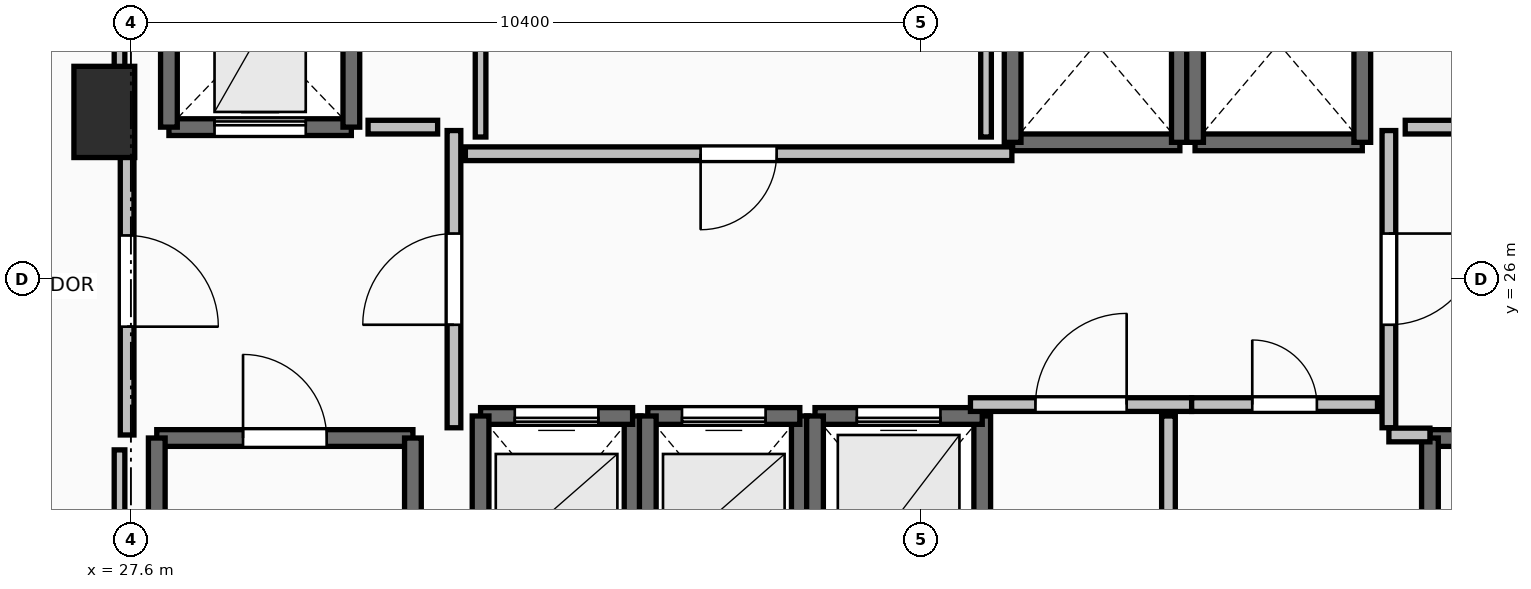
"""IFC4 building model, lengths in metres.
Left out: names, types, materials, properties, quantities, classifications, styles, units other than length and angle.
Written with IfcOpenShell. Run it as: python <this file> out.ifc"""

import sys

from ifc_helpers import new_model, si_unit, direction, frame, frame_2d, origin, origin_2d, place, context, subcontext, project, spatial, rectangle, extrude, element, fill, save


model = new_model("IFC4")
c1 = context("Model", 3, precision=1e-05, world=origin(), true_north=direction((0.0, 1.0)))
c2 = subcontext(c1, "Body", "Model", "MODEL_VIEW")
j1 = project(units=[si_unit("LENGTHUNIT", "METRE"), si_unit("PLANEANGLEUNIT", "RADIAN")], contexts=[c1])
p1 = place(None, origin())
s1 = spatial("IfcSite", under=j1, at=p1, CompositionType="ELEMENT")
p2 = place(p1, origin())
s2 = spatial("IfcBuilding", under=s1, at=p2, CompositionType="ELEMENT")
p3 = place(p2, frame((0.0, 0.0, 153.6)))
s3 = spatial("IfcBuildingStorey", under=s2, at=p3, CompositionType="ELEMENT", Elevation=153.6)
p4 = place(p3, frame((27.25, 28.2, 0.0), z_axis=(0.0, 0.0, 1.0), x_axis=(1.0, 0.0, 0.0)))
e1 = element("IfcColumn", 1, at=p4, inside=s3, PredefinedType="PILASTER", context=c2, shape_type="SweptSolid", body=[
    extrude(rectangle(XDim=0.8, YDim=1.2, at=origin_2d()), origin(), (0.0, 0.0, 1.0), 3.5),
])
p5 = place(p3, frame((27.94, 23.91, 0.0), z_axis=(0.0, 0.0, 1.0), x_axis=(1.0, 0.0, 0.0)))
e2 = element("IfcWall", 2, at=p5, inside=s3, PredefinedType="SOLIDWALL", context=c2, shape_type="SweptSolid", body=[
    extrude(rectangle(XDim=3.37, YDim=0.22, at=frame_2d((1.685, 0.0))), origin(), (0.0, 0.0, 1.0), 3.24),
])
p6 = place(p5, frame((1.135, 0.0, 0.0)))
e3 = element("IfcOpeningElement", 3, at=p6, cuts=e2, PredefinedType="OPENING", context=c2, shape_type="SweptSolid", body=[
    extrude(rectangle(XDim=1.1, YDim=2.15, at=frame_2d((0.55, 1.075))), frame((0.0, 0.125, 0.0), z_axis=(0.0, -1.0, 0.0), x_axis=(1.0, 0.0, 0.0)), (0.0, 0.0, 1.0), 0.25),
])
for number, where, z_axis, x_axis in (
    (4, (31.31, 23.91, 0.0), (0.0, 0.0, 1.0), (0.0, -1.0, 0.0)),
    (5, (27.94, 16.49, 0.0), (0.0, 0.0, 1.0), (0.0, 1.0, 0.0)),
):
    element("IfcWall", number, at=place(p3, frame(where, z_axis=z_axis, x_axis=x_axis)), inside=s3, PredefinedType="SOLIDWALL", context=c2, shape_type="SweptSolid", body=[
        extrude(rectangle(XDim=7.42, YDim=0.22, at=frame_2d((3.71, 0.0))), origin(), (0.0, 0.0, 1.0), 3.24),
    ])
p7 = place(p3, frame((44.69, 23.91, 0.0), z_axis=(0.0, 0.0, 1.0), x_axis=(1.0, 0.0, 0.0)))
e6 = element("IfcWall", 6, at=p7, inside=s3, PredefinedType="SOLIDWALL", context=c2, shape_type="SweptSolid", body=[
    extrude(rectangle(XDim=3.37, YDim=0.22, at=frame_2d((1.685, 0.0))), origin(), (0.0, 0.0, 1.0), 3.24),
])
p8 = place(p7, frame((1.135, 0.0, 0.0)))
e7 = element("IfcOpeningElement", 7, at=p8, cuts=e6, PredefinedType="OPENING", context=c2, shape_type="SweptSolid", body=[
    extrude(rectangle(XDim=1.1, YDim=2.15, at=frame_2d((0.55, 1.075))), frame((0.0, 0.125, 0.0), z_axis=(0.0, -1.0, 0.0), x_axis=(1.0, 0.0, 0.0)), (0.0, 0.0, 1.0), 0.25),
])
p9 = place(p3, frame((44.69, 16.49, 0.0), z_axis=(0.0, 0.0, 1.0), x_axis=(0.0, 1.0, 0.0)))
e8 = element("IfcWall", 8, at=p9, inside=s3, PredefinedType="SOLIDWALL", context=c2, shape_type="SweptSolid", body=[
    extrude(rectangle(XDim=7.42, YDim=0.22, at=frame_2d((3.71, 0.0))), origin(), (0.0, 0.0, 1.0), 3.24),
])
p10 = place(p3, frame((34.2, 21.8, 0.0), z_axis=(0.0, 0.0, 1.0), x_axis=(0.0, 1.0, 0.0)))
e9 = element("IfcWall", 9, at=p10, inside=s3, PredefinedType="SOLIDWALL", context=c2, shape_type="SweptSolid", body=[
    extrude(rectangle(XDim=2.4, YDim=0.22, at=frame_2d((1.2, 0.0))), origin(), (0.0, 0.0, 1.0), 3.24),
])
p11 = place(p3, frame((34.2, 24.2, 0.0), z_axis=(0.0, 0.0, 1.0), x_axis=(-1.0, 0.0, 0.0)))
e10 = element("IfcWall", 10, at=p11, inside=s3, PredefinedType="SOLIDWALL", context=c2, shape_type="SweptSolid", body=[
    extrude(rectangle(XDim=2.0, YDim=0.22, at=frame_2d((1.0, 0.0))), origin(), (0.0, 0.0, 1.0), 3.24),
])
p12 = place(p11, frame((0.45, 0.0, 0.0)))
e11 = element("IfcOpeningElement", 11, at=p12, cuts=e10, PredefinedType="OPENING", context=c2, shape_type="SweptSolid", body=[
    extrude(rectangle(XDim=1.1, YDim=2.2, at=frame_2d((0.55, 1.1))), frame((0.0, 0.125, 0.0), z_axis=(0.0, -1.0, 0.0), x_axis=(1.0, 0.0, 0.0)), (0.0, 0.0, 1.0), 0.25),
])
for number, where, z_axis, x_axis in (
    (12, (32.2, 24.2, 0.0), (0.0, 0.0, 1.0), (0.0, -1.0, 0.0)),
    (13, (36.4, 21.8, 0.0), (0.0, 0.0, 1.0), (0.0, 1.0, 0.0)),
):
    element("IfcWall", number, at=place(p3, frame(where, z_axis=z_axis, x_axis=x_axis)), inside=s3, PredefinedType="SOLIDWALL", context=c2, shape_type="SweptSolid", body=[
        extrude(rectangle(XDim=2.4, YDim=0.22, at=frame_2d((1.2, 0.0))), origin(), (0.0, 0.0, 1.0), 3.24),
    ])
p13 = place(p3, frame((36.4, 24.2, 0.0), z_axis=(0.0, 0.0, 1.0), x_axis=(-1.0, 0.0, 0.0)))
e14 = element("IfcWall", 14, at=p13, inside=s3, PredefinedType="SOLIDWALL", context=c2, shape_type="SweptSolid", body=[
    extrude(rectangle(XDim=2.0, YDim=0.22, at=frame_2d((1.0, 0.0))), origin(), (0.0, 0.0, 1.0), 3.24),
])
p14 = place(p13, frame((0.45, 0.0, 0.0)))
e15 = element("IfcOpeningElement", 15, at=p14, cuts=e14, PredefinedType="OPENING", context=c2, shape_type="SweptSolid", body=[
    extrude(rectangle(XDim=1.1, YDim=2.2, at=frame_2d((0.55, 1.1))), frame((0.0, 0.125, 0.0), z_axis=(0.0, -1.0, 0.0), x_axis=(1.0, 0.0, 0.0)), (0.0, 0.0, 1.0), 0.25),
])
p15 = place(p3, frame((34.4, 24.2, 0.0), z_axis=(0.0, 0.0, 1.0), x_axis=(0.0, -1.0, 0.0)))
e16 = element("IfcWall", 16, at=p15, inside=s3, PredefinedType="SOLIDWALL", context=c2, shape_type="SweptSolid", body=[
    extrude(rectangle(XDim=2.4, YDim=0.22, at=frame_2d((1.2, 0.0))), origin(), (0.0, 0.0, 1.0), 3.24),
])
p16 = place(p3, frame((38.8, 21.6, 0.0), z_axis=(0.0, 0.0, 1.0), x_axis=(0.0, 1.0, 0.0)))
e17 = element("IfcWall", 17, at=p16, inside=s3, PredefinedType="SOLIDWALL", context=c2, shape_type="SweptSolid", body=[
    extrude(rectangle(XDim=2.6, YDim=0.22, at=frame_2d((1.3, 0.0))), origin(), (0.0, 0.0, 1.0), 3.24),
])
p17 = place(p3, frame((38.8, 24.2, 0.0), z_axis=(0.0, 0.0, 1.0), x_axis=(-1.0, 0.0, 0.0)))
e18 = element("IfcWall", 18, at=p17, inside=s3, PredefinedType="SOLIDWALL", context=c2, shape_type="SweptSolid", body=[
    extrude(rectangle(XDim=2.2, YDim=0.22, at=frame_2d((1.1, 0.0))), origin(), (0.0, 0.0, 1.0), 3.24),
])
p18 = place(p17, frame((0.55, 0.0, 0.0)))
e19 = element("IfcOpeningElement", 19, at=p18, cuts=e18, PredefinedType="OPENING", context=c2, shape_type="SweptSolid", body=[
    extrude(rectangle(XDim=1.1, YDim=2.2, at=frame_2d((0.55, 1.1))), frame((0.0, 0.125, 0.0), z_axis=(0.0, -1.0, 0.0), x_axis=(1.0, 0.0, 0.0)), (0.0, 0.0, 1.0), 0.25),
])
p19 = place(p3, frame((36.6, 24.2, 0.0), z_axis=(0.0, 0.0, 1.0), x_axis=(0.0, -1.0, 0.0)))
e20 = element("IfcWall", 20, at=p19, inside=s3, PredefinedType="SOLIDWALL", context=c2, shape_type="SweptSolid", body=[
    extrude(rectangle(XDim=2.6, YDim=0.22, at=frame_2d((1.3, 0.0))), origin(), (0.0, 0.0, 1.0), 3.24),
])
p20 = place(p3, frame((39.2, 27.8, 0.0), z_axis=(0.0, 0.0, 1.0), x_axis=(1.0, 0.0, 0.0)))
e21 = element("IfcWall", 21, at=p20, inside=s3, PredefinedType="SOLIDWALL", context=c2, shape_type="SweptSolid", body=[
    extrude(rectangle(XDim=2.2, YDim=0.22, at=frame_2d((1.1, 0.0))), origin(), (0.0, 0.0, 1.0), 3.24),
])
for number, where, z_axis, x_axis in (
    (22, (41.4, 27.8, 0.0), (0.0, 0.0, 1.0), (0.0, 1.0, 0.0)),
    (23, (39.2, 30.4, 0.0), (0.0, 0.0, 1.0), (0.0, -1.0, 0.0)),
):
    element("IfcWall", number, at=place(p3, frame(where, z_axis=z_axis, x_axis=x_axis)), inside=s3, PredefinedType="SOLIDWALL", context=c2, shape_type="SweptSolid", body=[
        extrude(rectangle(XDim=2.6, YDim=0.22, at=frame_2d((1.3, 0.0))), origin(), (0.0, 0.0, 1.0), 3.24),
    ])
p21 = place(p3, frame((41.6, 27.8, 0.0), z_axis=(0.0, 0.0, 1.0), x_axis=(1.0, 0.0, 0.0)))
e24 = element("IfcWall", 24, at=p21, inside=s3, PredefinedType="SOLIDWALL", context=c2, shape_type="SweptSolid", body=[
    extrude(rectangle(XDim=2.2, YDim=0.22, at=frame_2d((1.1, 0.0))), origin(), (0.0, 0.0, 1.0), 3.24),
])
for number, where, z_axis, x_axis in (
    (25, (43.8, 27.8, 0.0), (0.0, 0.0, 1.0), (0.0, 1.0, 0.0)),
    (26, (41.6, 30.4, 0.0), (0.0, 0.0, 1.0), (0.0, -1.0, 0.0)),
):
    element("IfcWall", number, at=place(p3, frame(where, z_axis=z_axis, x_axis=x_axis)), inside=s3, PredefinedType="SOLIDWALL", context=c2, shape_type="SweptSolid", body=[
        extrude(rectangle(XDim=2.6, YDim=0.22, at=frame_2d((1.3, 0.0))), origin(), (0.0, 0.0, 1.0), 3.24),
    ])
p22 = place(p3, frame((28.1, 28.0, 0.0), z_axis=(0.0, 0.0, 1.0), x_axis=(1.0, 0.0, 0.0)))
e27 = element("IfcWall", 27, at=p22, inside=s3, PredefinedType="SHEAR", context=c2, shape_type="SweptSolid", body=[
    extrude(rectangle(XDim=2.4, YDim=0.22, at=frame_2d((1.2, 0.0))), origin(), (0.0, 0.0, 1.0), 3.24),
])
p23 = place(p22, frame((0.6, 0.0, 0.0)))
e28 = element("IfcOpeningElement", 28, at=p23, cuts=e27, PredefinedType="OPENING", context=c2, shape_type="SweptSolid", body=[
    extrude(rectangle(XDim=1.2, YDim=2.2, at=frame_2d((0.6, 1.1))), frame((0.0, 0.125, 0.0), z_axis=(0.0, -1.0, 0.0), x_axis=(1.0, 0.0, 0.0)), (0.0, 0.0, 1.0), 0.25),
])
for number, where, z_axis, x_axis in (
    (29, (30.5, 28.0, 0.0), (0.0, 0.0, 1.0), (0.0, 1.0, 0.0)),
    (30, (28.1, 30.5, 0.0), (0.0, 0.0, 1.0), (0.0, -1.0, 0.0)),
):
    element("IfcWall", number, at=place(p3, frame(where, z_axis=z_axis, x_axis=x_axis)), inside=s3, PredefinedType="SHEAR", context=c2, shape_type="SweptSolid", body=[
        extrude(rectangle(XDim=2.5, YDim=0.22, at=frame_2d((1.25, 0.0))), origin(), (0.0, 0.0, 1.0), 3.24),
    ])
p24 = place(p3, frame((31.85, 24.045, 0.0), z_axis=(0.0, 0.0, 1.0), x_axis=(0.0, 1.0, 0.0)))
e31 = element("IfcWall", 31, at=p24, inside=s3, PredefinedType="PARTITIONING", context=c2, shape_type="SweptSolid", body=[
    extrude(rectangle(XDim=3.91, YDim=0.18, at=frame_2d((1.955, 0.0))), origin(), (0.0, 0.0, 1.0), 3.24),
])
p25 = place(p24, frame((1.355, 0.0, 0.0)))
e32 = element("IfcOpeningElement", 32, at=p25, cuts=e31, PredefinedType="OPENING", context=c2, shape_type="SweptSolid", body=[
    extrude(rectangle(XDim=1.2, YDim=2.15, at=frame_2d((0.6, 1.075))), frame((0.0, 0.105, 0.0), z_axis=(0.0, -1.0, 0.0), x_axis=(1.0, 0.0, 0.0)), (0.0, 0.0, 1.0), 0.21),
])
p26 = place(p3, frame((27.55, 28.0, 0.0), z_axis=(0.0, 0.0, 1.0), x_axis=(0.0, -1.0, 0.0)))
e33 = element("IfcWall", 33, at=p26, inside=s3, PredefinedType="PARTITIONING", context=c2, shape_type="SweptSolid", body=[
    extrude(rectangle(XDim=4.05, YDim=0.18, at=frame_2d((2.025, 0.0))), origin(), (0.0, 0.0, 1.0), 3.24),
])
p27 = place(p26, frame((1.425, 0.0, 0.0)))
e34 = element("IfcOpeningElement", 34, at=p27, cuts=e33, PredefinedType="OPENING", context=c2, shape_type="SweptSolid", body=[
    extrude(rectangle(XDim=1.2, YDim=2.15, at=frame_2d((0.6, 1.075))), frame((0.0, 0.105, 0.0), z_axis=(0.0, -1.0, 0.0), x_axis=(1.0, 0.0, 0.0)), (0.0, 0.0, 1.0), 0.21),
])
p28 = place(p3, frame((44.15, 27.955, 0.0), z_axis=(0.0, 0.0, 1.0), x_axis=(0.0, -1.0, 0.0)))
e35 = element("IfcWall", 35, at=p28, inside=s3, PredefinedType="PARTITIONING", context=c2, shape_type="SweptSolid", body=[
    extrude(rectangle(XDim=3.91, YDim=0.18, at=frame_2d((1.955, 0.0))), origin(), (0.0, 0.0, 1.0), 3.24),
])
p29 = place(p28, frame((1.355, 0.0, 0.0)))
e36 = element("IfcOpeningElement", 36, at=p29, cuts=e35, PredefinedType="OPENING", context=c2, shape_type="SweptSolid", body=[
    extrude(rectangle(XDim=1.2, YDim=2.15, at=frame_2d((0.6, 1.075))), frame((0.0, 0.105, 0.0), z_axis=(0.0, -1.0, 0.0), x_axis=(1.0, 0.0, 0.0)), (0.0, 0.0, 1.0), 0.21),
])
p30 = place(p3, frame((44.15, 23.95, 0.0), z_axis=(0.0, 0.0, 1.0), x_axis=(1.0, 0.0, 0.0)))
e37 = element("IfcWall", 37, at=p30, inside=s3, PredefinedType="PARTITIONING", context=c2, shape_type="SweptSolid", body=[
    extrude(rectangle(XDim=0.54, YDim=0.18, at=frame_2d((0.27, 0.0))), origin(), (0.0, 0.0, 1.0), 3.24),
])
p31 = place(p3, frame((38.645, 24.35, 0.0), z_axis=(0.0, 0.0, 1.0), x_axis=(1.0, 0.0, 0.0)))
e38 = element("IfcWall", 38, at=p31, inside=s3, PredefinedType="PARTITIONING", context=c2, shape_type="SweptSolid", body=[
    extrude(rectangle(XDim=2.91, YDim=0.18, at=frame_2d((1.455, 0.0))), origin(), (0.0, 0.0, 1.0), 3.24),
])
p32 = place(p31, frame((0.855, 0.0, 0.0)))
e39 = element("IfcOpeningElement", 39, at=p32, cuts=e38, PredefinedType="OPENING", context=c2, shape_type="SweptSolid", body=[
    extrude(rectangle(XDim=1.2, YDim=2.15, at=frame_2d((0.6, 1.075))), frame((0.0, 0.105, 0.0), z_axis=(0.0, -1.0, 0.0), x_axis=(1.0, 0.0, 0.0)), (0.0, 0.0, 1.0), 0.21),
])
p33 = place(p3, frame((41.555, 24.35, 0.0), z_axis=(0.0, 0.0, 1.0), x_axis=(1.0, 0.0, 0.0)))
e40 = element("IfcWall", 40, at=p33, inside=s3, PredefinedType="PARTITIONING", context=c2, shape_type="SweptSolid", body=[
    extrude(rectangle(XDim=2.445, YDim=0.18, at=frame_2d((1.223, 0.0))), origin(), (0.0, 0.0, 1.0), 3.24),
])
p34 = place(p33, frame((0.798, 0.0, 0.0)))
e41 = element("IfcOpeningElement", 41, at=p34, cuts=e40, PredefinedType="OPENING", context=c2, shape_type="SweptSolid", body=[
    extrude(rectangle(XDim=0.85, YDim=2.1, at=frame_2d((0.425, 1.05))), frame((0.0, 0.105, 0.0), z_axis=(0.0, -1.0, 0.0), x_axis=(1.0, 0.0, 0.0)), (0.0, 0.0, 1.0), 0.21),
])
p35 = place(p3, frame((39.19, 27.65, 0.0), z_axis=(0.0, 0.0, 1.0), x_axis=(-1.0, 0.0, 0.0)))
e42 = element("IfcWall", 42, at=p35, inside=s3, PredefinedType="PARTITIONING", context=c2, shape_type="SweptSolid", body=[
    extrude(rectangle(XDim=7.19, YDim=0.18, at=frame_2d((3.595, 0.0))), origin(), (0.0, 0.0, 1.0), 3.24),
])
p36 = place(p35, frame((3.095, 0.0, 0.0)))
e43 = element("IfcOpeningElement", 43, at=p36, cuts=e42, PredefinedType="OPENING", context=c2, shape_type="SweptSolid", body=[
    extrude(rectangle(XDim=1.0, YDim=2.15, at=frame_2d((0.5, 1.075))), frame((0.0, 0.105, 0.0), z_axis=(0.0, -1.0, 0.0), x_axis=(1.0, 0.0, 0.0)), (0.0, 0.0, 1.0), 0.21),
])
p37 = place(p3, frame((41.25, 20.305, 0.0), z_axis=(0.0, 0.0, 1.0), x_axis=(0.0, 1.0, 0.0)))
e44 = element("IfcWall", 44, at=p37, inside=s3, PredefinedType="PARTITIONING", context=c2, shape_type="SweptSolid", body=[
    extrude(rectangle(XDim=3.895, YDim=0.18, at=frame_2d((1.948, 0.0))), origin(), (0.0, 0.0, 1.0), 3.24),
])
p38 = place(p37, frame((1.522, 0.0, 0.0)))
e45 = element("IfcOpeningElement", 45, at=p38, cuts=e44, PredefinedType="OPENING", context=c2, shape_type="SweptSolid", body=[
    extrude(rectangle(XDim=0.85, YDim=2.1, at=frame_2d((0.425, 1.05))), frame((0.0, 0.105, 0.0), z_axis=(0.0, -1.0, 0.0), x_axis=(1.0, 0.0, 0.0)), (0.0, 0.0, 1.0), 0.21),
])
for number, where, z_axis, x_axis in (
    (46, (31.635, 28.0, 0.0), (0.0, 0.0, 1.0), (-1.0, 0.0, 0.0)),
    (47, (45.28, 28.0, 0.0), (0.0, 0.0, 1.0), (-1.0, 0.0, 0.0)),
):
    element("IfcWall", number, at=place(p3, frame(where, z_axis=z_axis, x_axis=x_axis)), inside=s3, PredefinedType="PARTITIONING", context=c2, shape_type="SweptSolid", body=[
        extrude(rectangle(XDim=0.915, YDim=0.18, at=frame_2d((0.458, 0.0))), origin(), (0.0, 0.0, 1.0), 3.24),
    ])
for number, where, z_axis, x_axis in (
    (48, (32.2, 30.26, 0.0), (0.0, 0.0, 1.0), (0.0, -1.0, 0.0)),
    (49, (38.85, 27.87, 0.0), (0.0, 0.0, 1.0), (0.0, 1.0, 0.0)),
):
    element("IfcWall", number, at=place(p3, frame(where, z_axis=z_axis, x_axis=x_axis)), inside=s3, PredefinedType="PARTITIONING", context=c2, shape_type="SweptSolid", body=[
        extrude(rectangle(XDim=2.39, YDim=0.14, at=frame_2d((1.195, 0.0))), origin(), (0.0, 0.0, 1.0), 3.24),
    ])
p39 = place(p3, frame((27.45, 33.45, 0.0), z_axis=(0.0, 0.0, 1.0), x_axis=(0.0, -1.0, 0.0)))
e50 = element("IfcWall", 50, at=p39, inside=s3, PredefinedType="PARTITIONING", context=c2, shape_type="SweptSolid", body=[
    extrude(rectangle(XDim=5.254, YDim=0.14, at=frame_2d((2.627, 0.0))), origin(), (0.0, 0.0, 1.0), 2.432),
])
p40 = place(p3, frame((27.45, 23.754, 0.0), z_axis=(0.0, 0.0, 1.0), x_axis=(0.0, -1.0, 0.0)))
e51 = element("IfcWall", 51, at=p40, inside=s3, PredefinedType="PARTITIONING", context=c2, shape_type="SweptSolid", body=[
    extrude(rectangle(XDim=7.514, YDim=0.14, at=frame_2d((3.757, 0.0))), origin(), (0.0, 0.0, 1.0), 2.432),
])
p41 = place(p6, origin())
e52 = element("IfcDoor", 52, at=p41, inside=s3, OperationType="SINGLE_SWING_LEFT", PredefinedType="DOOR", context=c2, shape_type="SweptSolid", body=[
    extrude(rectangle(XDim=1.1, YDim=2.15, at=frame_2d((0.55, 1.075))), frame((0.0, 0.025, 0.0), z_axis=(0.0, -1.0, 0.0), x_axis=(1.0, 0.0, 0.0)), (0.0, 0.0, 1.0), 0.05),
])
fill(e3, e52)
p42 = place(p12, origin())
e53 = element("IfcDoor", 53, at=p42, inside=s3, OperationType="SLIDING_TO_LEFT", PredefinedType="DOOR", context=c2, shape_type="SweptSolid", body=[
    extrude(rectangle(XDim=1.1, YDim=2.2, at=frame_2d((0.55, 1.1))), frame((0.0, 0.025, 0.0), z_axis=(0.0, -1.0, 0.0), x_axis=(1.0, 0.0, 0.0)), (0.0, 0.0, 1.0), 0.05),
])
fill(e11, e53)
p43 = place(p14, origin())
e54 = element("IfcDoor", 54, at=p43, inside=s3, OperationType="SLIDING_TO_LEFT", PredefinedType="DOOR", context=c2, shape_type="SweptSolid", body=[
    extrude(rectangle(XDim=1.1, YDim=2.2, at=frame_2d((0.55, 1.1))), frame((0.0, 0.025, 0.0), z_axis=(0.0, -1.0, 0.0), x_axis=(1.0, 0.0, 0.0)), (0.0, 0.0, 1.0), 0.05),
])
fill(e15, e54)
p44 = place(p18, origin())
e55 = element("IfcDoor", 55, at=p44, inside=s3, OperationType="SLIDING_TO_LEFT", PredefinedType="DOOR", context=c2, shape_type="SweptSolid", body=[
    extrude(rectangle(XDim=1.1, YDim=2.2, at=frame_2d((0.55, 1.1))), frame((0.0, 0.025, 0.0), z_axis=(0.0, -1.0, 0.0), x_axis=(1.0, 0.0, 0.0)), (0.0, 0.0, 1.0), 0.05),
])
fill(e19, e55)
p45 = place(p23, origin())
e56 = element("IfcDoor", 56, at=p45, inside=s3, OperationType="SLIDING_TO_LEFT", PredefinedType="DOOR", context=c2, shape_type="SweptSolid", body=[
    extrude(rectangle(XDim=1.2, YDim=2.2, at=frame_2d((0.6, 1.1))), frame((0.0, 0.025, 0.0), z_axis=(0.0, -1.0, 0.0), x_axis=(1.0, 0.0, 0.0)), (0.0, 0.0, 1.0), 0.05),
])
fill(e28, e56)
p46 = place(p25, origin())
e57 = element("IfcDoor", 57, at=p46, inside=s3, OperationType="SINGLE_SWING_LEFT", PredefinedType="DOOR", context=c2, shape_type="SweptSolid", body=[
    extrude(rectangle(XDim=1.2, YDim=2.15, at=frame_2d((0.6, 1.075))), frame((0.0, 0.025, 0.0), z_axis=(0.0, -1.0, 0.0), x_axis=(1.0, 0.0, 0.0)), (0.0, 0.0, 1.0), 0.05),
])
fill(e32, e57)
p47 = place(p27, origin())
e58 = element("IfcDoor", 58, at=p47, inside=s3, OperationType="SINGLE_SWING_RIGHT", PredefinedType="DOOR", context=c2, shape_type="SweptSolid", body=[
    extrude(rectangle(XDim=1.2, YDim=2.15, at=frame_2d((0.6, 1.075))), frame((0.0, 0.025, 0.0), z_axis=(0.0, -1.0, 0.0), x_axis=(1.0, 0.0, 0.0)), (0.0, 0.0, 1.0), 0.05),
])
fill(e34, e58)
p48 = place(p29, origin())
e59 = element("IfcDoor", 59, at=p48, inside=s3, OperationType="SINGLE_SWING_LEFT", PredefinedType="DOOR", context=c2, shape_type="SweptSolid", body=[
    extrude(rectangle(XDim=1.2, YDim=2.15, at=frame_2d((0.6, 1.075))), frame((0.0, 0.025, 0.0), z_axis=(0.0, -1.0, 0.0), x_axis=(1.0, 0.0, 0.0)), (0.0, 0.0, 1.0), 0.05),
])
fill(e36, e59)
p49 = place(p32, origin())
e60 = element("IfcDoor", 60, at=p49, inside=s3, OperationType="SINGLE_SWING_RIGHT", PredefinedType="DOOR", context=c2, shape_type="SweptSolid", body=[
    extrude(rectangle(XDim=1.2, YDim=2.15, at=frame_2d((0.6, 1.075))), frame((0.0, 0.025, 0.0), z_axis=(0.0, -1.0, 0.0), x_axis=(1.0, 0.0, 0.0)), (0.0, 0.0, 1.0), 0.05),
])
fill(e39, e60)
p50 = place(p34, origin())
e61 = element("IfcDoor", 61, at=p50, inside=s3, OperationType="SINGLE_SWING_LEFT", PredefinedType="DOOR", context=c2, shape_type="SweptSolid", body=[
    extrude(rectangle(XDim=0.85, YDim=2.1, at=frame_2d((0.425, 1.05))), frame((0.0, 0.025, 0.0), z_axis=(0.0, -1.0, 0.0), x_axis=(1.0, 0.0, 0.0)), (0.0, 0.0, 1.0), 0.05),
])
fill(e41, e61)
p51 = place(p36, origin())
e62 = element("IfcDoor", 62, at=p51, inside=s3, OperationType="SINGLE_SWING_RIGHT", PredefinedType="DOOR", context=c2, shape_type="SweptSolid", body=[
    extrude(rectangle(XDim=1.0, YDim=2.15, at=frame_2d((0.5, 1.075))), frame((0.0, 0.025, 0.0), z_axis=(0.0, -1.0, 0.0), x_axis=(1.0, 0.0, 0.0)), (0.0, 0.0, 1.0), 0.05),
])
fill(e43, e62)
save(model, sys.argv[1])
